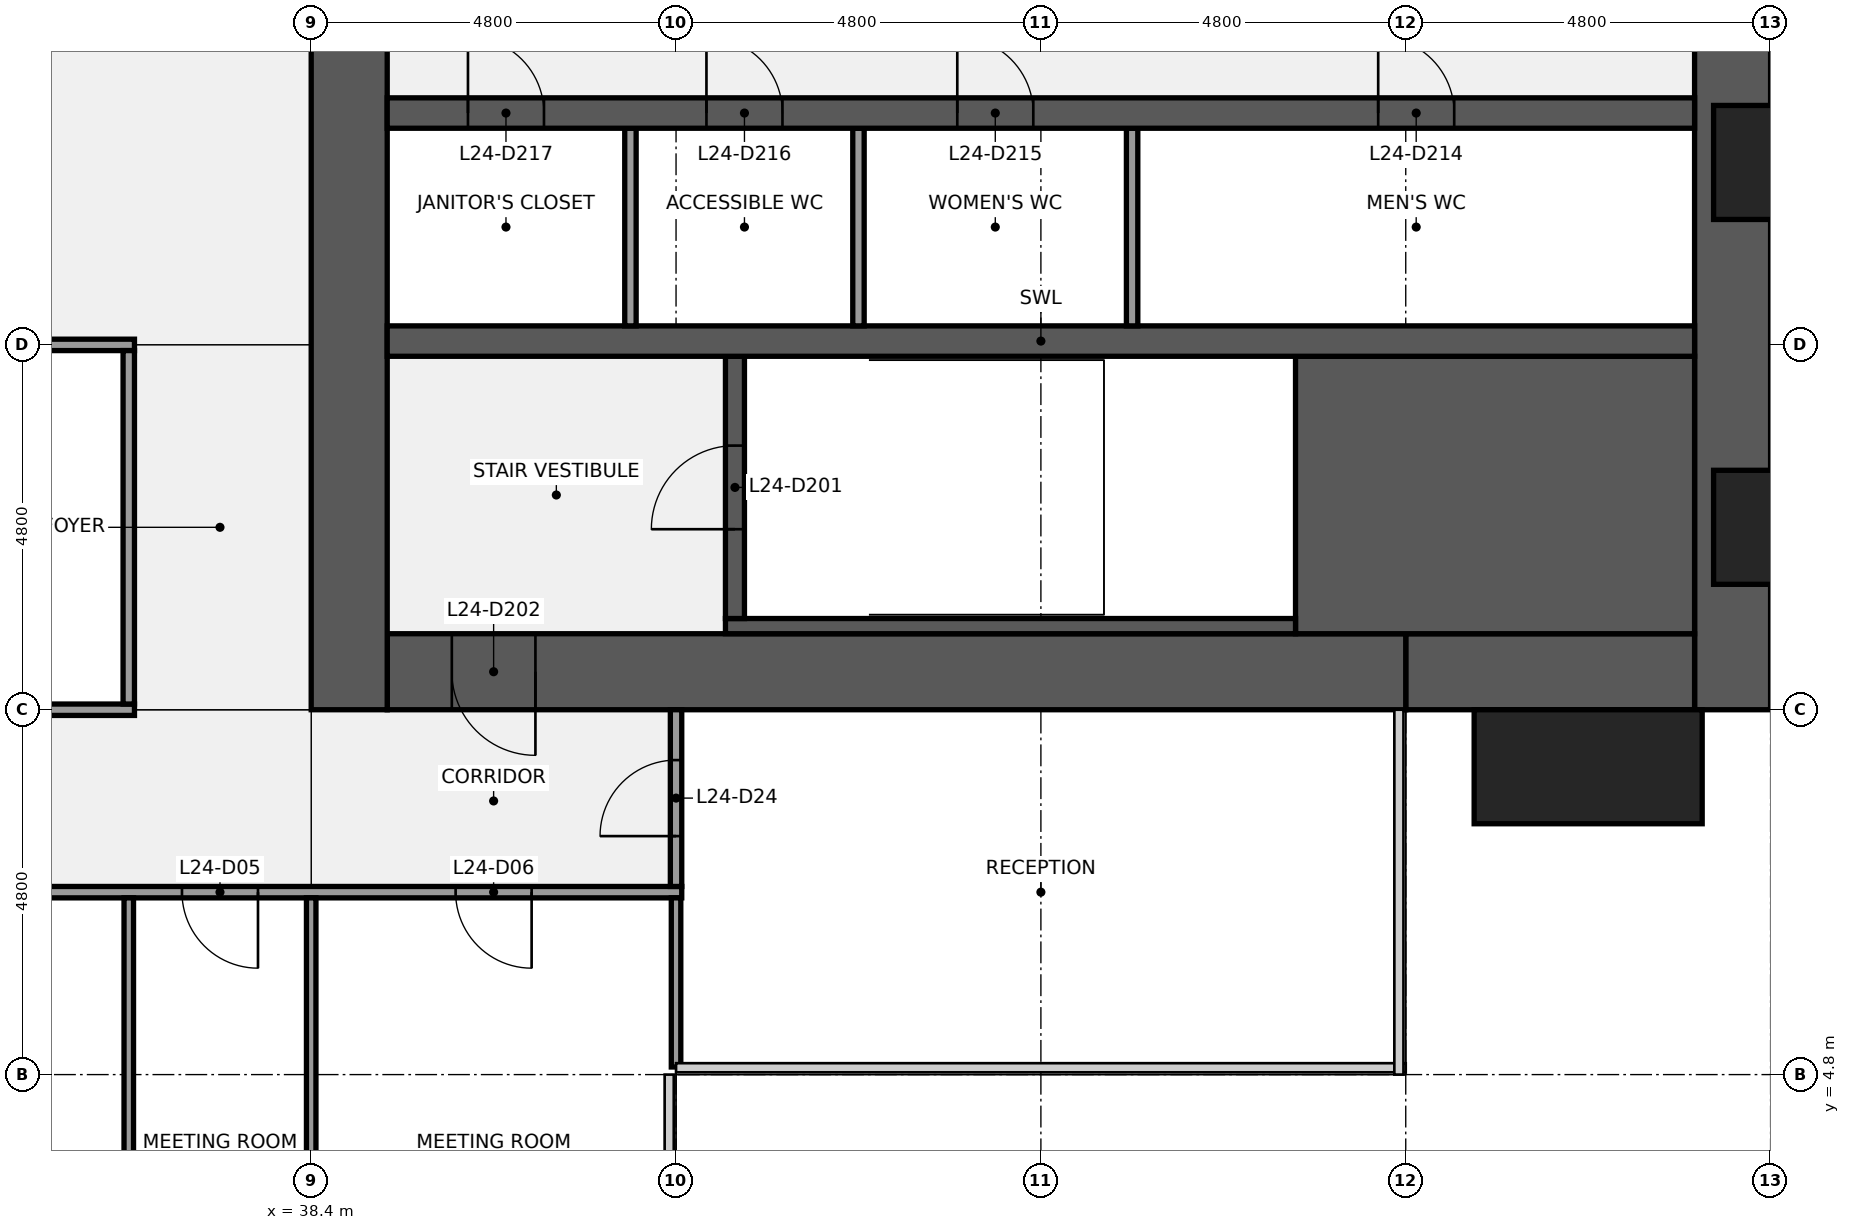
"""IFC4 building model, lengths in metres.
Left out: names, types, materials, properties, quantities, classifications, styles, units other than length and angle.
Written with IfcOpenShell. Run it as: python <this file> out.ifc"""

import sys

from ifc_helpers import new_model, si_unit, direction, frame, frame_2d, origin, origin_2d, place, context, subcontext, project, spatial, rectangle, extrude, element, fill, save


model = new_model("IFC4")
c1 = context("Model", 3, precision=1e-05, world=origin(), true_north=direction((0.0, 1.0)))
c2 = subcontext(c1, "Body", "Model", "MODEL_VIEW")
j1 = project(units=[si_unit("LENGTHUNIT", "METRE"), si_unit("PLANEANGLEUNIT", "RADIAN")], contexts=[c1])
p1 = place(None, origin())
s1 = spatial("IfcSite", under=j1, at=p1, CompositionType="ELEMENT")
p2 = place(p1, origin())
s2 = spatial("IfcBuilding", under=s1, at=p2, CompositionType="ELEMENT")
p3 = place(p2, frame((0.0, 0.0, 116.1)))
s3 = spatial("IfcBuildingStorey", under=s2, at=p3, CompositionType="ELEMENT", Elevation=116.1)
p4 = place(p3, frame((57.1, 38.4, 0.0), z_axis=(0.0, 0.0, 1.0), x_axis=(0.0, -1.0, 0.0)))
e1 = element("IfcWall", 1, at=p4, inside=s3, PredefinedType="SHEAR", context=c2, shape_type="SweptSolid", body=[
    extrude(rectangle(XDim=28.8, YDim=1.0, at=frame_2d((14.4, 0.0))), origin(), (0.0, 0.0, 1.0), 3.84),
])
p5 = place(p4, frame((18.45, 0.0, 0.9)))
e2 = element("IfcOpeningElement", 2, at=p5, cuts=e1, PredefinedType="OPENING", context=c2, shape_type="SweptSolid", body=[
    extrude(rectangle(XDim=1.5, YDim=1.5, at=frame_2d((0.75, 0.75))), frame((0.0, 0.51, 0.0), z_axis=(0.0, -1.0, 0.0), x_axis=(1.0, 0.0, 0.0)), (0.0, 0.0, 1.0), 1.02),
])
p6 = place(p4, frame((8.85, 0.0, 0.9)))
e3 = element("IfcOpeningElement", 3, at=p6, cuts=e1, PredefinedType="OPENING", context=c2, shape_type="SweptSolid", body=[
    extrude(rectangle(XDim=1.5, YDim=1.5, at=frame_2d((0.75, 0.75))), frame((0.0, 0.51, 0.0), z_axis=(0.0, -1.0, 0.0), x_axis=(1.0, 0.0, 0.0)), (0.0, 0.0, 1.0), 1.02),
])
p7 = place(p3, frame((56.6, 10.1, 0.0), z_axis=(0.0, 0.0, 1.0), x_axis=(-1.0, 0.0, 0.0)))
e4 = element("IfcWall", 4, at=p7, inside=s3, PredefinedType="SHEAR", context=c2, shape_type="SweptSolid", body=[
    extrude(rectangle(XDim=3.8, YDim=1.0, at=frame_2d((1.9, 0.0))), origin(), (0.0, 0.0, 1.0), 3.84),
])
p8 = place(p3, frame((52.8, 10.1, 0.0), z_axis=(0.0, 0.0, 1.0), x_axis=(-1.0, 0.0, 0.0)))
e5 = element("IfcWall", 5, at=p8, inside=s3, PredefinedType="SHEAR", context=c2, shape_type="SweptSolid", body=[
    extrude(rectangle(XDim=13.4, YDim=1.0, at=frame_2d((6.7, 0.0))), origin(), (0.0, 0.0, 1.0), 3.84),
])
p9 = place(p8, frame((11.45, 0.0, 0.0)))
e6 = element("IfcOpeningElement", 6, at=p9, cuts=e5, PredefinedType="OPENING", context=c2, shape_type="SweptSolid", body=[
    extrude(rectangle(XDim=1.1, YDim=2.1, at=frame_2d((0.55, 1.05))), frame((0.0, 0.51, 0.0), z_axis=(0.0, -1.0, 0.0), x_axis=(1.0, 0.0, 0.0)), (0.0, 0.0, 1.0), 1.02),
])
p10 = place(p3, frame((38.9, 9.6, 0.0), z_axis=(0.0, 0.0, 1.0), x_axis=(0.0, 1.0, 0.0)))
e7 = element("IfcWall", 7, at=p10, inside=s3, PredefinedType="SHEAR", context=c2, shape_type="SweptSolid", body=[
    extrude(rectangle(XDim=28.8, YDim=1.0, at=frame_2d((14.4, 0.0))), origin(), (0.0, 0.0, 1.0), 3.84),
])
p11 = place(p10, frame((8.7, 0.0, 0.0)))
e8 = element("IfcOpeningElement", 8, at=p11, cuts=e7, PredefinedType="OPENING", context=c2, shape_type="SweptSolid", body=[
    extrude(rectangle(XDim=1.8, YDim=2.1, at=frame_2d((0.9, 1.05))), frame((0.0, 0.51, 0.0), z_axis=(0.0, -1.0, 0.0), x_axis=(1.0, 0.0, 0.0)), (0.0, 0.0, 1.0), 1.02),
])
p12 = place(p10, frame((18.3, 0.0, 0.0)))
e9 = element("IfcOpeningElement", 9, at=p12, cuts=e7, PredefinedType="OPENING", context=c2, shape_type="SweptSolid", body=[
    extrude(rectangle(XDim=1.8, YDim=2.1, at=frame_2d((0.9, 1.05))), frame((0.0, 0.51, 0.0), z_axis=(0.0, -1.0, 0.0), x_axis=(1.0, 0.0, 0.0)), (0.0, 0.0, 1.0), 1.02),
])
p13 = place(p3, frame((51.35, 12.425, 0.0), z_axis=(0.0, 0.0, 1.0), x_axis=(1.0, 0.0, 0.0)))
e10 = element("IfcWall", 10, at=p13, inside=s3, PredefinedType="SHEAR", context=c2, shape_type="SweptSolid", body=[
    extrude(rectangle(XDim=5.25, YDim=3.65, at=frame_2d((2.625, 0.0))), origin(), (0.0, 0.0, 1.0), 3.84),
])
p14 = place(p3, frame((43.85, 10.7, 0.0), z_axis=(0.0, 0.0, 1.0), x_axis=(1.0, 0.0, 0.0)))
e11 = element("IfcWall", 11, at=p14, inside=s3, PredefinedType="SHEAR", context=c2, shape_type="SweptSolid", body=[
    extrude(rectangle(XDim=7.5, YDim=0.2, at=frame_2d((3.75, 0.0))), origin(), (0.0, 0.0, 1.0), 3.84),
])
p15 = place(p3, frame((43.975, 10.8, 0.0), z_axis=(0.0, 0.0, 1.0), x_axis=(0.0, 1.0, 0.0)))
e12 = element("IfcWall", 12, at=p15, inside=s3, PredefinedType="SHEAR", context=c2, shape_type="SweptSolid", body=[
    extrude(rectangle(XDim=3.45, YDim=0.25, at=frame_2d((1.725, 0.0))), origin(), (0.0, 0.0, 1.0), 3.84),
])
p16 = place(p15, frame((1.175, 0.0, 0.0)))
e13 = element("IfcOpeningElement", 13, at=p16, cuts=e12, PredefinedType="OPENING", context=c2, shape_type="SweptSolid", body=[
    extrude(rectangle(XDim=1.1, YDim=2.1, at=frame_2d((0.55, 1.05))), frame((0.0, 0.135, 0.0), z_axis=(0.0, -1.0, 0.0), x_axis=(1.0, 0.0, 0.0)), (0.0, 0.0, 1.0), 0.27),
])
p17 = place(p3, frame((39.4, 14.45, 0.0), z_axis=(0.0, 0.0, 1.0), x_axis=(1.0, 0.0, 0.0)))
e14 = element("IfcWall", 14, at=p17, inside=s3, PredefinedType="SHEAR", context=c2, shape_type="SweptSolid", body=[
    extrude(rectangle(XDim=17.2, YDim=0.4, at=frame_2d((8.6, 0.0))), origin(), (0.0, 0.0, 1.0), 3.84),
])
for number, where, z_axis, x_axis in (
    (15, (49.2, 14.65, 0.0), (0.0, 0.0, 1.0), (0.0, 1.0, 0.0)),
    (16, (45.6, 14.65, 0.0), (0.0, 0.0, 1.0), (0.0, 1.0, 0.0)),
    (17, (42.6, 14.65, 0.0), (0.0, 0.0, 1.0), (0.0, 1.0, 0.0)),
):
    element("IfcWall", number, at=place(p3, frame(where, z_axis=z_axis, x_axis=x_axis)), inside=s3, PredefinedType="PARTITIONING", context=c2, shape_type="SweptSolid", body=[
        extrude(rectangle(XDim=2.6, YDim=0.15, at=frame_2d((1.3, 0.0))), origin(), (0.0, 0.0, 1.0), 3.84),
    ])
p18 = place(p3, frame((39.4, 17.45, 0.0), z_axis=(0.0, 0.0, 1.0), x_axis=(1.0, 0.0, 0.0)))
e18 = element("IfcWall", 18, at=p18, inside=s3, PredefinedType="SHEAR", context=c2, shape_type="SweptSolid", body=[
    extrude(rectangle(XDim=17.2, YDim=0.4, at=frame_2d((8.6, 0.0))), origin(), (0.0, 0.0, 1.0), 3.84),
])
p19 = place(p18, frame((13.038, 0.0, 0.0)))
e19 = element("IfcOpeningElement", 19, at=p19, cuts=e18, PredefinedType="OPENING", context=c2, shape_type="SweptSolid", body=[
    extrude(rectangle(XDim=1.0, YDim=2.1, at=frame_2d((0.5, 1.05))), frame((0.0, 0.21, 0.0), z_axis=(0.0, -1.0, 0.0), x_axis=(1.0, 0.0, 0.0)), (0.0, 0.0, 1.0), 0.42),
])
p20 = place(p18, frame((7.5, 0.0, 0.0)))
e20 = element("IfcOpeningElement", 20, at=p20, cuts=e18, PredefinedType="OPENING", context=c2, shape_type="SweptSolid", body=[
    extrude(rectangle(XDim=1.0, YDim=2.1, at=frame_2d((0.5, 1.05))), frame((0.0, 0.21, 0.0), z_axis=(0.0, -1.0, 0.0), x_axis=(1.0, 0.0, 0.0)), (0.0, 0.0, 1.0), 0.42),
])
p21 = place(p18, frame((4.2, 0.0, 0.0)))
e21 = element("IfcOpeningElement", 21, at=p21, cuts=e18, PredefinedType="OPENING", context=c2, shape_type="SweptSolid", body=[
    extrude(rectangle(XDim=1.0, YDim=2.1, at=frame_2d((0.5, 1.05))), frame((0.0, 0.21, 0.0), z_axis=(0.0, -1.0, 0.0), x_axis=(1.0, 0.0, 0.0)), (0.0, 0.0, 1.0), 0.42),
])
p22 = place(p18, frame((1.062, 0.0, 0.0)))
e22 = element("IfcOpeningElement", 22, at=p22, cuts=e18, PredefinedType="OPENING", context=c2, shape_type="SweptSolid", body=[
    extrude(rectangle(XDim=1.0, YDim=2.1, at=frame_2d((0.5, 1.05))), frame((0.0, 0.21, 0.0), z_axis=(0.0, -1.0, 0.0), x_axis=(1.0, 0.0, 0.0)), (0.0, 0.0, 1.0), 0.42),
])
p23 = place(p3, frame((14.325, 7.2, 0.0), z_axis=(0.0, 0.0, 1.0), x_axis=(1.0, 0.0, 0.0)))
e23 = element("IfcWall", 23, at=p23, inside=s3, PredefinedType="PARTITIONING", context=c2, shape_type="SweptSolid", body=[
    extrude(rectangle(XDim=28.95, YDim=0.15, at=frame_2d((14.475, 0.0))), origin(), (0.0, 0.0, 1.0), 2.936),
])
p24 = place(p23, frame((1.975, 0.0, 0.0)))
e24 = element("IfcOpeningElement", 24, at=p24, cuts=e23, PredefinedType="OPENING", context=c2, shape_type="SweptSolid", body=[
    extrude(rectangle(XDim=1.0, YDim=2.1, at=frame_2d((0.5, 1.05))), frame((0.0, 0.085, 0.0), z_axis=(0.0, -1.0, 0.0), x_axis=(1.0, 0.0, 0.0)), (0.0, 0.0, 1.0), 0.17),
])
p25 = place(p23, frame((9.175, 0.0, 0.0)))
e25 = element("IfcOpeningElement", 25, at=p25, cuts=e23, PredefinedType="OPENING", context=c2, shape_type="SweptSolid", body=[
    extrude(rectangle(XDim=1.0, YDim=2.1, at=frame_2d((0.5, 1.05))), frame((0.0, 0.085, 0.0), z_axis=(0.0, -1.0, 0.0), x_axis=(1.0, 0.0, 0.0)), (0.0, 0.0, 1.0), 0.17),
])
p26 = place(p23, frame((15.175, 0.0, 0.0)))
e26 = element("IfcOpeningElement", 26, at=p26, cuts=e23, PredefinedType="OPENING", context=c2, shape_type="SweptSolid", body=[
    extrude(rectangle(XDim=1.0, YDim=2.1, at=frame_2d((0.5, 1.05))), frame((0.0, 0.085, 0.0), z_axis=(0.0, -1.0, 0.0), x_axis=(1.0, 0.0, 0.0)), (0.0, 0.0, 1.0), 0.17),
])
p27 = place(p23, frame((18.775, 0.0, 0.0)))
e27 = element("IfcOpeningElement", 27, at=p27, cuts=e23, PredefinedType="OPENING", context=c2, shape_type="SweptSolid", body=[
    extrude(rectangle(XDim=1.0, YDim=2.1, at=frame_2d((0.5, 1.05))), frame((0.0, 0.085, 0.0), z_axis=(0.0, -1.0, 0.0), x_axis=(1.0, 0.0, 0.0)), (0.0, 0.0, 1.0), 0.17),
])
p28 = place(p23, frame((22.375, 0.0, 0.0)))
e28 = element("IfcOpeningElement", 28, at=p28, cuts=e23, PredefinedType="OPENING", context=c2, shape_type="SweptSolid", body=[
    extrude(rectangle(XDim=1.0, YDim=2.1, at=frame_2d((0.5, 1.05))), frame((0.0, 0.085, 0.0), z_axis=(0.0, -1.0, 0.0), x_axis=(1.0, 0.0, 0.0)), (0.0, 0.0, 1.0), 0.17),
])
p29 = place(p23, frame((25.975, 0.0, 0.0)))
e29 = element("IfcOpeningElement", 29, at=p29, cuts=e23, PredefinedType="OPENING", context=c2, shape_type="SweptSolid", body=[
    extrude(rectangle(XDim=1.0, YDim=2.1, at=frame_2d((0.5, 1.05))), frame((0.0, 0.085, 0.0), z_axis=(0.0, -1.0, 0.0), x_axis=(1.0, 0.0, 0.0)), (0.0, 0.0, 1.0), 0.17),
])
p30 = place(p3, frame((21.525, 9.6, 0.0), z_axis=(0.0, 0.0, 1.0), x_axis=(1.0, 0.0, 0.0)))
e30 = element("IfcWall", 30, at=p30, inside=s3, PredefinedType="PARTITIONING", context=c2, shape_type="SweptSolid", body=[
    extrude(rectangle(XDim=14.55, YDim=0.15, at=frame_2d((7.275, 0.0))), origin(), (0.0, 0.0, 1.0), 2.936),
])
p31 = place(p30, frame((3.175, 0.0, 0.0)))
e31 = element("IfcOpeningElement", 31, at=p31, cuts=e30, PredefinedType="OPENING", context=c2, shape_type="SweptSolid", body=[
    extrude(rectangle(XDim=1.0, YDim=2.1, at=frame_2d((0.5, 1.05))), frame((0.0, 0.085, 0.0), z_axis=(0.0, -1.0, 0.0), x_axis=(1.0, 0.0, 0.0)), (0.0, 0.0, 1.0), 0.17),
])
p32 = place(p30, frame((10.375, 0.0, 0.0)))
e32 = element("IfcOpeningElement", 32, at=p32, cuts=e30, PredefinedType="OPENING", context=c2, shape_type="SweptSolid", body=[
    extrude(rectangle(XDim=1.0, YDim=2.1, at=frame_2d((0.5, 1.05))), frame((0.0, 0.085, 0.0), z_axis=(0.0, -1.0, 0.0), x_axis=(1.0, 0.0, 0.0)), (0.0, 0.0, 1.0), 0.17),
])
p33 = place(p3, frame((33.675, 14.4, 0.0), z_axis=(0.0, 0.0, 1.0), x_axis=(1.0, 0.0, 0.0)))
e33 = element("IfcWall", 33, at=p33, inside=s3, PredefinedType="PARTITIONING", context=c2, shape_type="SweptSolid", body=[
    extrude(rectangle(XDim=2.4, YDim=0.15, at=frame_2d((1.2, 0.0))), origin(), (0.0, 0.0, 1.0), 2.936),
])
p34 = place(p3, frame((36.0, 0.1, 0.0), z_axis=(0.0, 0.0, 1.0), x_axis=(0.0, 1.0, 0.0)))
e34 = element("IfcWall", 34, at=p34, inside=s3, PredefinedType="PARTITIONING", context=c2, shape_type="SweptSolid", body=[
    extrude(rectangle(XDim=7.025, YDim=0.125, at=frame_2d((3.512, 0.0))), origin(), (0.0, 0.0, 1.0), 2.936),
])
p35 = place(p3, frame((36.0, 9.675, 0.0), z_axis=(0.0, 0.0, 1.0), x_axis=(0.0, 1.0, 0.0)))
e35 = element("IfcWall", 35, at=p35, inside=s3, PredefinedType="PARTITIONING", context=c2, shape_type="SweptSolid", body=[
    extrude(rectangle(XDim=4.65, YDim=0.15, at=frame_2d((2.325, 0.0))), origin(), (0.0, 0.0, 1.0), 2.936),
])
p36 = place(p3, frame((38.4, 0.6, 0.0), z_axis=(0.0, 0.0, 1.0), x_axis=(0.0, 1.0, 0.0)))
e36 = element("IfcWall", 36, at=p36, inside=s3, PredefinedType="PARTITIONING", context=c2, shape_type="SweptSolid", body=[
    extrude(rectangle(XDim=6.525, YDim=0.125, at=frame_2d((3.262, 0.0))), origin(), (0.0, 0.0, 1.0), 2.936),
])
p37 = place(p3, frame((43.2, 4.9, 0.0), z_axis=(0.0, 0.0, 1.0), x_axis=(0.0, 1.0, 0.0)))
e37 = element("IfcWall", 37, at=p37, inside=s3, PredefinedType="PARTITIONING", context=c2, shape_type="SweptSolid", body=[
    extrude(rectangle(XDim=2.225, YDim=0.125, at=frame_2d((1.113, 0.0))), origin(), (0.0, 0.0, 1.0), 2.936),
])
p38 = place(p3, frame((43.2, 7.275, 0.0), z_axis=(0.0, 0.0, 1.0), x_axis=(0.0, 1.0, 0.0)))
e38 = element("IfcWall", 38, at=p38, inside=s3, PredefinedType="PARTITIONING", context=c2, shape_type="SweptSolid", body=[
    extrude(rectangle(XDim=2.325, YDim=0.15, at=frame_2d((1.163, 0.0))), origin(), (0.0, 0.0, 1.0), 2.936),
])
p39 = place(p38, frame((0.663, 0.0, 0.0)))
e39 = element("IfcOpeningElement", 39, at=p39, cuts=e38, PredefinedType="OPENING", context=c2, shape_type="SweptSolid", body=[
    extrude(rectangle(XDim=1.0, YDim=2.1, at=frame_2d((0.5, 1.05))), frame((0.0, 0.085, 0.0), z_axis=(0.0, -1.0, 0.0), x_axis=(1.0, 0.0, 0.0)), (0.0, 0.0, 1.0), 0.17),
])
p40 = place(p3, frame((55.2, 8.85, 0.0), z_axis=(0.0, 0.0, 1.0), x_axis=(1.0, 0.0, 0.0)))
e40 = element("IfcColumn", 40, at=p40, inside=s3, PredefinedType="PILASTER", context=c2, shape_type="SweptSolid", body=[
    extrude(rectangle(XDim=3.0, YDim=1.5, at=origin_2d()), origin(), (0.0, 0.0, 1.0), 4.0),
])
p41 = place(p16, origin())
e41 = element("IfcDoor", 41, at=p41, inside=s3, OperationType="SINGLE_SWING_LEFT", PredefinedType="DOOR", context=c2, shape_type="SweptSolid", body=[
    extrude(rectangle(XDim=1.1, YDim=2.1, at=frame_2d((0.55, 1.05))), frame((0.0, 0.025, 0.0), z_axis=(0.0, -1.0, 0.0), x_axis=(1.0, 0.0, 0.0)), (0.0, 0.0, 1.0), 0.05),
])
fill(e13, e41)
p42 = place(p9, origin())
e42 = element("IfcDoor", 42, at=p42, inside=s3, OperationType="SINGLE_SWING_LEFT", PredefinedType="DOOR", context=c2, shape_type="SweptSolid", body=[
    extrude(rectangle(XDim=1.1, YDim=2.1, at=frame_2d((0.55, 1.05))), frame((0.0, 0.025, 0.0), z_axis=(0.0, -1.0, 0.0), x_axis=(1.0, 0.0, 0.0)), (0.0, 0.0, 1.0), 0.05),
])
fill(e6, e42)
p43 = place(p19, origin())
e43 = element("IfcDoor", 43, at=p43, inside=s3, OperationType="SINGLE_SWING_LEFT", PredefinedType="DOOR", context=c2, shape_type="SweptSolid", body=[
    extrude(rectangle(XDim=1.0, YDim=2.1, at=frame_2d((0.5, 1.05))), frame((0.0, 0.025, 0.0), z_axis=(0.0, -1.0, 0.0), x_axis=(1.0, 0.0, 0.0)), (0.0, 0.0, 1.0), 0.05),
])
fill(e19, e43)
p44 = place(p20, origin())
e44 = element("IfcDoor", 44, at=p44, inside=s3, OperationType="SINGLE_SWING_LEFT", PredefinedType="DOOR", context=c2, shape_type="SweptSolid", body=[
    extrude(rectangle(XDim=1.0, YDim=2.1, at=frame_2d((0.5, 1.05))), frame((0.0, 0.025, 0.0), z_axis=(0.0, -1.0, 0.0), x_axis=(1.0, 0.0, 0.0)), (0.0, 0.0, 1.0), 0.05),
])
fill(e20, e44)
p45 = place(p21, origin())
e45 = element("IfcDoor", 45, at=p45, inside=s3, OperationType="SINGLE_SWING_LEFT", PredefinedType="DOOR", context=c2, shape_type="SweptSolid", body=[
    extrude(rectangle(XDim=1.0, YDim=2.1, at=frame_2d((0.5, 1.05))), frame((0.0, 0.025, 0.0), z_axis=(0.0, -1.0, 0.0), x_axis=(1.0, 0.0, 0.0)), (0.0, 0.0, 1.0), 0.05),
])
fill(e21, e45)
p46 = place(p22, origin())
e46 = element("IfcDoor", 46, at=p46, inside=s3, OperationType="SINGLE_SWING_LEFT", PredefinedType="DOOR", context=c2, shape_type="SweptSolid", body=[
    extrude(rectangle(XDim=1.0, YDim=2.1, at=frame_2d((0.5, 1.05))), frame((0.0, 0.025, 0.0), z_axis=(0.0, -1.0, 0.0), x_axis=(1.0, 0.0, 0.0)), (0.0, 0.0, 1.0), 0.05),
])
fill(e22, e46)
p47 = place(p28, origin())
e47 = element("IfcDoor", 47, at=p47, inside=s3, OperationType="SINGLE_SWING_RIGHT", PredefinedType="DOOR", context=c2, shape_type="SweptSolid", body=[
    extrude(rectangle(XDim=1.0, YDim=2.1, at=frame_2d((0.5, 1.05))), frame((0.0, 0.025, 0.0), z_axis=(0.0, -1.0, 0.0), x_axis=(1.0, 0.0, 0.0)), (0.0, 0.0, 1.0), 0.05),
])
fill(e28, e47)
p48 = place(p29, origin())
e48 = element("IfcDoor", 48, at=p48, inside=s3, OperationType="SINGLE_SWING_RIGHT", PredefinedType="DOOR", context=c2, shape_type="SweptSolid", body=[
    extrude(rectangle(XDim=1.0, YDim=2.1, at=frame_2d((0.5, 1.05))), frame((0.0, 0.025, 0.0), z_axis=(0.0, -1.0, 0.0), x_axis=(1.0, 0.0, 0.0)), (0.0, 0.0, 1.0), 0.05),
])
fill(e29, e48)
p49 = place(p39, origin())
e49 = element("IfcDoor", 49, at=p49, inside=s3, OperationType="SINGLE_SWING_LEFT", PredefinedType="DOOR", context=c2, shape_type="SweptSolid", body=[
    extrude(rectangle(XDim=1.0, YDim=2.1, at=frame_2d((0.5, 1.05))), frame((0.0, 0.025, 0.0), z_axis=(0.0, -1.0, 0.0), x_axis=(1.0, 0.0, 0.0)), (0.0, 0.0, 1.0), 0.05),
])
fill(e39, e49)
save(model, sys.argv[1])
